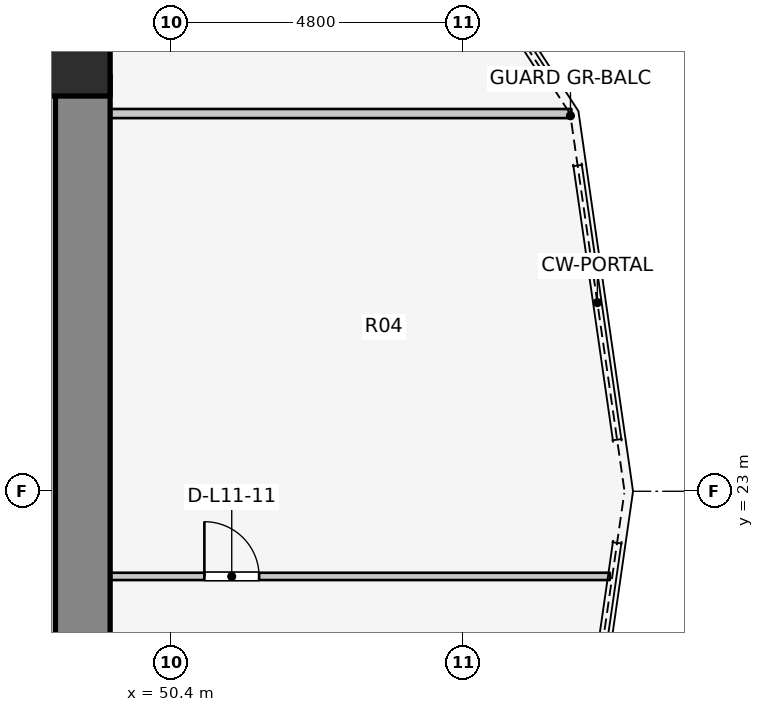
"""IFC4 building model, lengths in metres.
Left out: names, types, materials, properties, quantities, classifications, styles, units other than length and angle.
Written with IfcOpenShell. Run it as: python <this file> out.ifc"""

import sys

from ifc_helpers import new_model, si_unit, direction, frame, frame_2d, origin, origin_2d, place, context, subcontext, project, spatial, rectangle, extrude, element, fill, save


model = new_model("IFC4")
c1 = context("Model", 3, precision=1e-05, world=origin(), true_north=direction((0.0, 1.0)))
c2 = subcontext(c1, "Body", "Model", "MODEL_VIEW")
j1 = project(units=[si_unit("LENGTHUNIT", "METRE"), si_unit("PLANEANGLEUNIT", "RADIAN")], contexts=[c1])
p1 = place(None, origin())
s1 = spatial("IfcSite", under=j1, at=p1, CompositionType="ELEMENT")
p2 = place(p1, origin())
s2 = spatial("IfcBuilding", under=s1, at=p2, CompositionType="ELEMENT")
p3 = place(p2, frame((0.0, 0.0, 40.0)))
s3 = spatial("IfcBuildingStorey", under=s2, at=p3, CompositionType="ELEMENT", Elevation=40.0)
p4 = place(p3, frame((48.95, 17.05, 0.0), z_axis=(0.0, 0.0, 1.0), x_axis=(0.0, 1.0, 0.0)))
e1 = element("IfcWall", 1, at=p4, inside=s3, PredefinedType="SHEAR", context=c2, shape_type="SweptSolid", body=[
    extrude(rectangle(XDim=12.8, YDim=0.9, at=frame_2d((6.4, 0.0))), origin(), (0.0, 0.0, 1.0), 3.1),
])
p5 = place(p3, frame((48.7, 30.2, 0.0), z_axis=(0.0, 0.0, 1.0), x_axis=(1.0, 0.0, 0.0)))
e2 = element("IfcColumn", 2, at=p5, inside=s3, PredefinedType="COLUMN", context=c2, shape_type="SweptSolid", body=[
    extrude(rectangle(XDim=1.4, YDim=1.4, at=origin_2d()), origin(), (0.0, 0.0, 1.0), 3.1),
])
p6 = place(p3, frame((48.95, 29.212, 0.0), z_axis=(0.0, 0.0, 1.0), x_axis=(1.0, 0.0, 0.0)))
e3 = element("IfcWall", 3, at=p6, inside=s3, PredefinedType="PARTITIONING", context=c2, shape_type="SweptSolid", body=[
    extrude(rectangle(XDim=8.036, YDim=0.15, at=frame_2d((4.018, 0.0))), origin(), (0.0, 0.0, 1.0), 2.855),
])
p7 = place(p3, frame((48.95, 21.6, 0.0), z_axis=(0.0, 0.0, 1.0), x_axis=(1.0, 0.0, 0.0)))
e4 = element("IfcWall", 4, at=p7, inside=s3, PredefinedType="MOVABLE", context=c2, shape_type="SweptSolid", body=[
    extrude(rectangle(XDim=8.669, YDim=0.12, at=frame_2d((4.334, 0.0))), origin(), (0.0, 0.0, 1.0), 2.855),
])
p8 = place(p7, frame((2.0, 0.0, 0.0)))
e5 = element("IfcOpeningElement", 5, at=p8, cuts=e4, PredefinedType="OPENING", context=c2, shape_type="SweptSolid", body=[
    extrude(rectangle(XDim=0.9, YDim=2.1, at=frame_2d((0.45, 1.05))), frame((0.0, 0.07, 0.0), z_axis=(0.0, -1.0, 0.0), x_axis=(1.0, 0.0, 0.0)), (0.0, 0.0, 1.0), 0.14),
])
p9 = place(p3, frame((48.95, 29.8, 0.0), z_axis=(0.0, 0.0, 1.0), x_axis=(0.0, 1.0, 0.0)))
e6 = element("IfcWall", 6, at=p9, inside=s3, PredefinedType="PARTITIONING", context=c2, shape_type="SweptSolid", body=[
    extrude(rectangle(XDim=1.29, YDim=0.15, at=frame_2d((0.645, 0.0))), origin(), (0.0, 0.0, 1.0), 2.069),
])
p10 = place(p8, origin())
e7 = element("IfcDoor", 7, at=p10, inside=s3, OperationType="SINGLE_SWING_LEFT", PredefinedType="DOOR", context=c2, shape_type="SweptSolid", body=[
    extrude(rectangle(XDim=0.9, YDim=2.1, at=frame_2d((0.45, 1.05))), frame((0.0, 0.025, 0.0), z_axis=(0.0, -1.0, 0.0), x_axis=(1.0, 0.0, 0.0)), (0.0, 0.0, 1.0), 0.05),
])
fill(e5, e7)
save(model, sys.argv[1])
